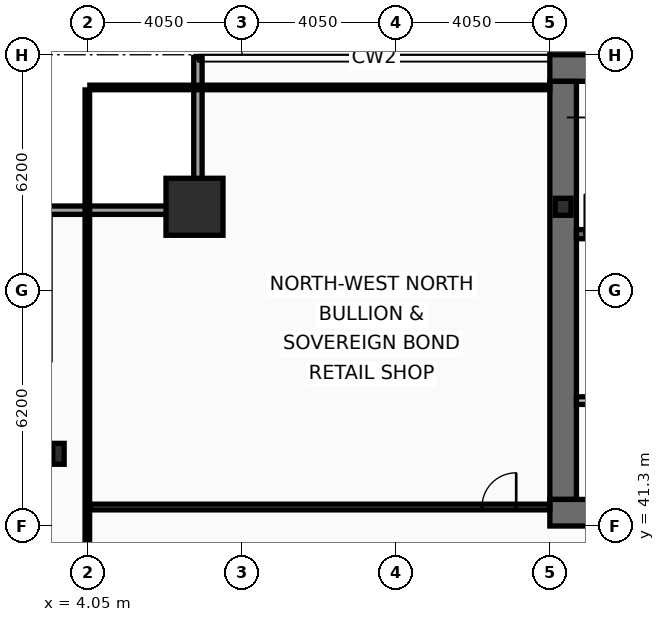
"""IFC4 building model, lengths in metres.
Left out: names, types, materials, properties, quantities, classifications, styles, units other than length and angle.
Written with IfcOpenShell. Run it as: python <this file> out.ifc"""

import sys

from ifc_helpers import new_model, si_unit, direction, frame, frame_2d, origin, origin_2d, place, context, subcontext, project, spatial, rectangle, hollow_rectangle, i_section, extrude, element, fill, save


model = new_model("IFC4")
c1 = context("Model", 3, precision=1e-05, world=origin(), true_north=direction((0.0, 1.0)))
c2 = subcontext(c1, "Body", "Model", "MODEL_VIEW")
j1 = project(units=[si_unit("LENGTHUNIT", "METRE"), si_unit("PLANEANGLEUNIT", "RADIAN")], contexts=[c1])
p1 = place(None, origin())
s1 = spatial("IfcSite", under=j1, at=p1, CompositionType="ELEMENT")
p2 = place(p1, origin())
s2 = spatial("IfcBuilding", under=s1, at=p2, CompositionType="ELEMENT")
p3 = place(p2, frame((0.0, 0.0, 125.4)))
s3 = spatial("IfcBuildingStorey", under=s2, at=p3, CompositionType="ELEMENT", Elevation=125.4)
p4 = place(p3, frame((16.2, 53.35, 0.0), z_axis=(0.0, 0.0, 1.0), x_axis=(1.0, 0.0, 0.0)))
e1 = element("IfcWall", 1, at=p4, inside=s3, PredefinedType="SHEAR", context=c2, shape_type="SweptSolid", body=[
    extrude(rectangle(XDim=40.5, YDim=0.7, at=frame_2d((20.25, 0.0))), origin(), (0.0, 0.0, 1.0), 3.44),
])
p5 = place(p3, frame((16.55, 42.0, 0.0), z_axis=(0.0, 0.0, 1.0), x_axis=(0.0, 1.0, 0.0)))
e2 = element("IfcWall", 2, at=p5, inside=s3, PredefinedType="SHEAR", context=c2, shape_type="SweptSolid", body=[
    extrude(rectangle(XDim=11.0, YDim=0.7, at=frame_2d((5.5, 0.0))), origin(), (0.0, 0.0, 1.0), 3.44),
])
p6 = place(p3, frame((18.65, 41.65, 0.0), z_axis=(0.0, 0.0, 1.0), x_axis=(-1.0, 0.0, 0.0)))
e3 = element("IfcWall", 3, at=p6, inside=s3, PredefinedType="SHEAR", context=c2, shape_type="SweptSolid", body=[
    extrude(rectangle(XDim=2.45, YDim=0.7, at=frame_2d((1.225, 0.0))), origin(), (0.0, 0.0, 1.0), 3.44),
])
p7 = place(p3, frame((16.9, 48.98, 0.0), z_axis=(0.0, 0.0, 1.0), x_axis=(1.0, 0.0, 0.0)))
e4 = element("IfcWall", 4, at=p7, inside=s3, PredefinedType="SHEAR", context=c2, shape_type="SweptSolid", body=[
    extrude(rectangle(XDim=7.32, YDim=0.24, at=frame_2d((3.66, 0.0))), origin(), (0.0, 0.0, 1.0), 3.44),
])
p8 = place(p7, frame((0.22, 0.0, 0.0)))
e5 = element("IfcOpeningElement", 5, at=p8, cuts=e4, PredefinedType="OPENING", context=c2, shape_type="SweptSolid", body=[
    extrude(rectangle(XDim=1.05, YDim=2.15, at=frame_2d((0.525, 1.075))), frame((0.0, 0.13, 0.0), z_axis=(0.0, -1.0, 0.0), x_axis=(1.0, 0.0, 0.0)), (0.0, 0.0, 1.0), 0.26),
])
p9 = place(p3, frame((6.85, 49.7, 0.0), z_axis=(0.0, 0.0, 1.0), x_axis=(1.0, 0.0, 0.0)))
e6 = element("IfcColumn", 6, at=p9, inside=s3, PredefinedType="COLUMN", context=c2, shape_type="SweptSolid", body=[
    extrude(hollow_rectangle(XDim=1.5, YDim=1.5, WallThickness=0.07, at=origin_2d()), origin(), (0.0, 0.0, 1.0), 3.6),
])
p10 = place(p3, frame((3.27, 43.2, 0.0), z_axis=(0.0, 0.0, 1.0), x_axis=(1.0, 0.0, 0.0)))
e7 = element("IfcColumn", 7, at=p10, inside=s3, PredefinedType="COLUMN", context=c2, shape_type="SweptSolid", body=[
    extrude(i_section(OverallWidth=0.3, OverallDepth=0.55, WebThickness=0.015, FlangeThickness=0.029, at=origin_2d()), origin(), (0.0, 0.0, 1.0), 3.6),
])
p11 = place(p3, frame((16.55, 49.7, 0.0), z_axis=(0.0, 0.0, 1.0), x_axis=(1.0, 0.0, 0.0)))
e8 = element("IfcColumn", 8, at=p11, inside=s3, PredefinedType="COLUMN", context=c2, shape_type="SweptSolid", body=[
    extrude(i_section(OverallWidth=0.416, OverallDepth=0.446, WebThickness=0.039, FlangeThickness=0.063, at=origin_2d()), origin(), (0.0, 0.0, 1.0), 3.6),
])
p12 = place(p3, frame((2.83, 49.61, 0.0), z_axis=(0.0, 0.0, 1.0), x_axis=(1.0, 0.0, 0.0)))
e9 = element("IfcWall", 9, at=p12, inside=s3, PredefinedType="SOLIDWALL", context=c2, shape_type="SweptSolid", body=[
    extrude(rectangle(XDim=4.22, YDim=0.22, at=frame_2d((2.11, 0.0))), origin(), (0.0, 0.0, 1.0), 2.83),
])
p13 = place(p3, frame((6.94, 49.72, 0.0), z_axis=(0.0, 0.0, 1.0), x_axis=(0.0, 1.0, 0.0)))
e10 = element("IfcWall", 10, at=p13, inside=s3, PredefinedType="SOLIDWALL", context=c2, shape_type="SweptSolid", body=[
    extrude(rectangle(XDim=3.91, YDim=0.22, at=frame_2d((1.955, 0.0))), origin(), (0.0, 0.0, 1.0), 2.83),
])
p14 = place(p3, frame((16.9, 44.6, 0.0), z_axis=(0.0, 0.0, 1.0), x_axis=(1.0, 0.0, 0.0)))
e11 = element("IfcWall", 11, at=p14, inside=s3, PredefinedType="PARTITIONING", context=c2, shape_type="SweptSolid", body=[
    extrude(rectangle(XDim=4.1, YDim=0.2, at=frame_2d((2.05, 0.0))), origin(), (0.0, 0.0, 1.0), 3.44),
])
p15 = place(p14, frame((1.25, 0.0, 0.0)))
e12 = element("IfcOpeningElement", 12, at=p15, cuts=e11, PredefinedType="OPENING", context=c2, shape_type="SweptSolid", body=[
    extrude(rectangle(XDim=1.05, YDim=2.15, at=frame_2d((0.525, 1.075))), frame((0.0, 0.11, 0.0), z_axis=(0.0, -1.0, 0.0), x_axis=(1.0, 0.0, 0.0)), (0.0, 0.0, 1.0), 0.22),
])
p16 = place(p3, frame((4.095, 41.8, 0.0), z_axis=(0.0, 0.0, 1.0), x_axis=(1.0, 0.0, 0.0)))
e13 = element("IfcWall", 13, at=p16, inside=s3, PredefinedType="PARTITIONING", context=c2, shape_type="SweptSolid", body=[
    extrude(rectangle(XDim=12.105, YDim=0.15, at=frame_2d((6.052, 0.0))), origin(), (0.0, 0.0, 1.0), 3.44),
])
p17 = place(p16, frame((10.32, 0.0, 0.0)))
e14 = element("IfcOpeningElement", 14, at=p17, cuts=e13, PredefinedType="OPENING", context=c2, shape_type="SweptSolid", body=[
    extrude(rectangle(XDim=0.9, YDim=2.05, at=frame_2d((0.45, 1.025))), frame((0.0, 0.085, 0.0), z_axis=(0.0, -1.0, 0.0), x_axis=(1.0, 0.0, 0.0)), (0.0, 0.0, 1.0), 0.17),
])
p18 = place(p3, frame((4.03, 10.665, 0.0), z_axis=(0.0, 0.0, 1.0), x_axis=(0.0, 1.0, 0.0)))
e15 = element("IfcWall", 15, at=p18, inside=s3, PredefinedType="PARTITIONING", context=c2, shape_type="SweptSolid", body=[
    extrude(rectangle(XDim=42.11, YDim=0.12, at=frame_2d((21.055, 0.0))), origin(), (0.0, 0.0, 1.0), 2.73),
])
p19 = place(p3, frame((4.095, 52.84, 0.0), z_axis=(0.0, 0.0, 1.0), x_axis=(1.0, 0.0, 0.0)))
e16 = element("IfcWall", 16, at=p19, inside=s3, PredefinedType="PARTITIONING", context=c2, shape_type="SweptSolid", body=[
    extrude(rectangle(XDim=12.105, YDim=0.12, at=frame_2d((6.052, 0.0))), origin(), (0.0, 0.0, 1.0), 3.44),
])
p20 = place(p8, origin())
e17 = element("IfcDoor", 17, at=p20, inside=s3, OperationType="SINGLE_SWING_LEFT", PredefinedType="DOOR", context=c2, shape_type="SweptSolid", body=[
    extrude(rectangle(XDim=1.05, YDim=2.15, at=frame_2d((0.525, 1.075))), frame((0.0, 0.025, 0.0), z_axis=(0.0, -1.0, 0.0), x_axis=(1.0, 0.0, 0.0)), (0.0, 0.0, 1.0), 0.05),
])
fill(e5, e17)
p21 = place(p17, origin())
e18 = element("IfcDoor", 18, at=p21, inside=s3, OperationType="SINGLE_SWING_RIGHT", PredefinedType="DOOR", context=c2, shape_type="SweptSolid", body=[
    extrude(rectangle(XDim=0.9, YDim=2.05, at=frame_2d((0.45, 1.025))), frame((0.0, 0.025, 0.0), z_axis=(0.0, -1.0, 0.0), x_axis=(1.0, 0.0, 0.0)), (0.0, 0.0, 1.0), 0.05),
])
fill(e14, e18)
save(model, sys.argv[1])
